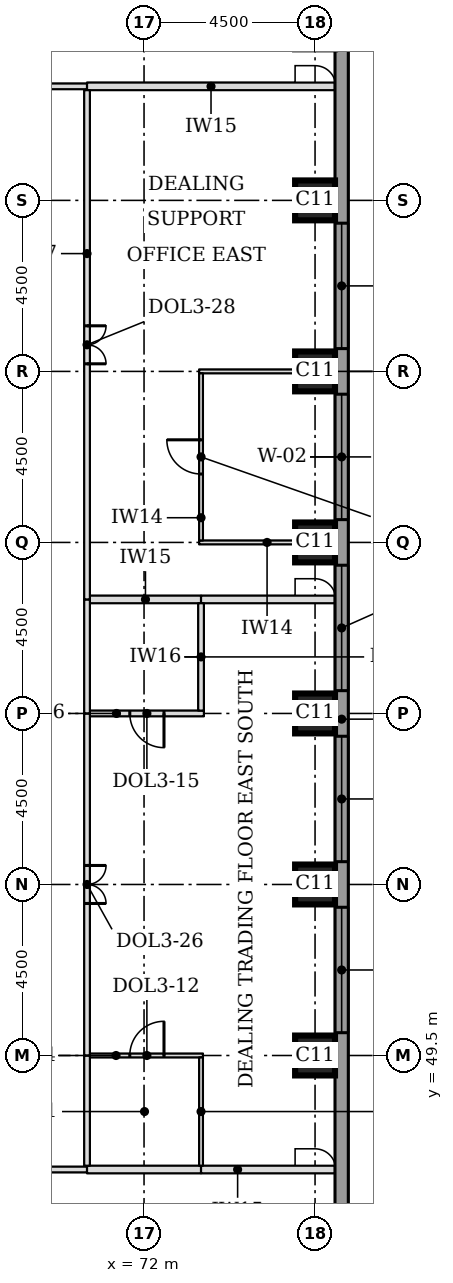
"""IFC4 building model, lengths in metres.
Left out: names, types, materials, properties, quantities, classifications, styles, units other than length and angle.
Written with IfcOpenShell. Run it as: python <this file> out.ifc"""

import sys

from ifc_helpers import new_model, si_unit, direction, frame, frame_2d, origin, origin_2d, place, context, subcontext, project, spatial, rectangle, extrude, element, fill, save


model = new_model("IFC4")
c1 = context("Model", 3, precision=1e-05, world=origin(), true_north=direction((0.0, 1.0)))
c2 = subcontext(c1, "Body", "Model", "MODEL_VIEW")
j1 = project(units=[si_unit("LENGTHUNIT", "METRE"), si_unit("PLANEANGLEUNIT", "RADIAN")], contexts=[c1])
p1 = place(None, origin())
s1 = spatial("IfcSite", under=j1, at=p1, CompositionType="ELEMENT")
p2 = place(p1, origin())
s2 = spatial("IfcBuilding", under=s1, at=p2, CompositionType="ELEMENT")
p3 = place(p2, frame((0.0, 0.0, 97.4)))
s3 = spatial("IfcBuildingStorey", under=s2, at=p3, CompositionType="ELEMENT", Elevation=97.4)
for number, where, z_axis, x_axis in (
    (1, (76.5, 49.5, 0.0), (0.0, 0.0, 1.0), (1.0, 0.0, 0.0)),
    (2, (76.5, 54.0, 0.0), (0.0, 0.0, 1.0), (1.0, 0.0, 0.0)),
    (3, (76.5, 58.5, 0.0), (0.0, 0.0, 1.0), (1.0, 0.0, 0.0)),
    (4, (76.5, 63.0, 0.0), (0.0, 0.0, 1.0), (1.0, 0.0, 0.0)),
    (5, (76.5, 67.5, 0.0), (0.0, 0.0, 1.0), (1.0, 0.0, 0.0)),
    (6, (76.5, 72.0, 0.0), (0.0, 0.0, 1.0), (1.0, 0.0, 0.0)),
):
    element("IfcColumn", number, at=place(p3, frame(where, z_axis=z_axis, x_axis=x_axis)), inside=s3, PredefinedType="COLUMN", context=c2, shape_type="SweptSolid", body=[
        extrude(rectangle(XDim=1.05, YDim=1.05, at=origin_2d()), origin(), (0.0, 0.0, 1.0), 3.7),
    ])
p4 = place(p3, frame((77.2, 44.638, 0.0), z_axis=(0.0, 0.0, 1.0), x_axis=(0.0, 1.0, 0.0)))
e7 = element("IfcWall", 7, at=p4, inside=s3, PredefinedType="STANDARD", context=c2, shape_type="SweptSolid", body=[
    extrude(rectangle(XDim=32.225, YDim=0.35, at=frame_2d((16.112, 0.0))), origin(), (0.0, 0.0, 1.0), 3.525),
])
p5 = place(p4, frame((5.462, 0.0, 0.9)))
e8 = element("IfcOpeningElement", 8, at=p5, cuts=e7, PredefinedType="OPENING", context=c2, shape_type="SweptSolid", body=[
    extrude(rectangle(XDim=3.3, YDim=1.9, at=frame_2d((1.65, 0.95))), frame((0.0, 0.185, 0.0), z_axis=(0.0, -1.0, 0.0), x_axis=(1.0, 0.0, 0.0)), (0.0, 0.0, 1.0), 0.37),
])
p6 = place(p4, frame((9.962, 0.0, 0.9)))
e9 = element("IfcOpeningElement", 9, at=p6, cuts=e7, PredefinedType="OPENING", context=c2, shape_type="SweptSolid", body=[
    extrude(rectangle(XDim=3.3, YDim=1.9, at=frame_2d((1.65, 0.95))), frame((0.0, 0.185, 0.0), z_axis=(0.0, -1.0, 0.0), x_axis=(1.0, 0.0, 0.0)), (0.0, 0.0, 1.0), 0.37),
])
p7 = place(p4, frame((14.462, 0.0, 0.9)))
e10 = element("IfcOpeningElement", 10, at=p7, cuts=e7, PredefinedType="OPENING", context=c2, shape_type="SweptSolid", body=[
    extrude(rectangle(XDim=3.3, YDim=1.9, at=frame_2d((1.65, 0.95))), frame((0.0, 0.185, 0.0), z_axis=(0.0, -1.0, 0.0), x_axis=(1.0, 0.0, 0.0)), (0.0, 0.0, 1.0), 0.37),
])
p8 = place(p4, frame((18.962, 0.0, 0.9)))
e11 = element("IfcOpeningElement", 11, at=p8, cuts=e7, PredefinedType="OPENING", context=c2, shape_type="SweptSolid", body=[
    extrude(rectangle(XDim=3.3, YDim=1.9, at=frame_2d((1.65, 0.95))), frame((0.0, 0.185, 0.0), z_axis=(0.0, -1.0, 0.0), x_axis=(1.0, 0.0, 0.0)), (0.0, 0.0, 1.0), 0.37),
])
p9 = place(p4, frame((23.462, 0.0, 0.9)))
e12 = element("IfcOpeningElement", 12, at=p9, cuts=e7, PredefinedType="OPENING", context=c2, shape_type="SweptSolid", body=[
    extrude(rectangle(XDim=3.3, YDim=1.9, at=frame_2d((1.65, 0.95))), frame((0.0, 0.185, 0.0), z_axis=(0.0, -1.0, 0.0), x_axis=(1.0, 0.0, 0.0)), (0.0, 0.0, 1.0), 0.37),
])
p10 = place(p3, frame((54.0, 46.5, 0.0), z_axis=(0.0, 0.0, 1.0), x_axis=(1.0, 0.0, 0.0)))
e13 = element("IfcWall", 13, at=p10, inside=s3, PredefinedType="PARTITIONING", context=c2, shape_type="SweptSolid", body=[
    extrude(rectangle(XDim=16.5, YDim=0.15, at=frame_2d((8.25, 0.0))), origin(), (0.0, 0.0, 1.0), 3.55),
])
p11 = place(p3, frame((70.5, 46.5, 0.0), z_axis=(0.0, 0.0, 1.0), x_axis=(1.0, 0.0, 0.0)))
e14 = element("IfcWall", 14, at=p11, inside=s3, PredefinedType="PARTITIONING", context=c2, shape_type="SweptSolid", body=[
    extrude(rectangle(XDim=3.0, YDim=0.2, at=frame_2d((1.5, 0.0))), origin(), (0.0, 0.0, 1.0), 3.55),
])
p12 = place(p3, frame((73.5, 46.5, 0.0), z_axis=(0.0, 0.0, 1.0), x_axis=(1.0, 0.0, 0.0)))
e15 = element("IfcWall", 15, at=p12, inside=s3, PredefinedType="PARTITIONING", context=c2, shape_type="SweptSolid", body=[
    extrude(rectangle(XDim=3.525, YDim=0.2, at=frame_2d((1.762, 0.0))), origin(), (0.0, 0.0, 1.0), 3.55),
])
p13 = place(p3, frame((70.575, 49.5, 0.0), z_axis=(0.0, 0.0, 1.0), x_axis=(1.0, 0.0, 0.0)))
e16 = element("IfcWall", 16, at=p13, inside=s3, PredefinedType="PARTITIONING", context=c2, shape_type="SweptSolid", body=[
    extrude(rectangle(XDim=2.975, YDim=0.1, at=frame_2d((1.488, 0.0))), origin(), (0.0, 0.0, 1.0), 3.55),
])
p14 = place(p13, frame((1.05, 0.0, 0.0)))
e17 = element("IfcOpeningElement", 17, at=p14, cuts=e16, PredefinedType="OPENING", context=c2, shape_type="SweptSolid", body=[
    extrude(rectangle(XDim=0.9, YDim=2.1, at=frame_2d((0.45, 1.05))), frame((0.0, 0.06, 0.0), z_axis=(0.0, -1.0, 0.0), x_axis=(1.0, 0.0, 0.0)), (0.0, 0.0, 1.0), 0.12),
])
p15 = place(p3, frame((70.575, 58.5, 0.0), z_axis=(0.0, 0.0, 1.0), x_axis=(1.0, 0.0, 0.0)))
e18 = element("IfcWall", 18, at=p15, inside=s3, PredefinedType="PARTITIONING", context=c2, shape_type="SweptSolid", body=[
    extrude(rectangle(XDim=3.0, YDim=0.15, at=frame_2d((1.5, 0.0))), origin(), (0.0, 0.0, 1.0), 3.55),
])
p16 = place(p15, frame((1.05, 0.0, 0.0)))
e19 = element("IfcOpeningElement", 19, at=p16, cuts=e18, PredefinedType="OPENING", context=c2, shape_type="SweptSolid", body=[
    extrude(rectangle(XDim=0.9, YDim=2.1, at=frame_2d((0.45, 1.05))), frame((0.0, 0.085, 0.0), z_axis=(0.0, -1.0, 0.0), x_axis=(1.0, 0.0, 0.0)), (0.0, 0.0, 1.0), 0.17),
])
p17 = place(p3, frame((70.575, 61.5, 0.0), z_axis=(0.0, 0.0, 1.0), x_axis=(1.0, 0.0, 0.0)))
e20 = element("IfcWall", 20, at=p17, inside=s3, PredefinedType="PARTITIONING", context=c2, shape_type="SweptSolid", body=[
    extrude(rectangle(XDim=2.925, YDim=0.2, at=frame_2d((1.462, 0.0))), origin(), (0.0, 0.0, 1.0), 3.55),
])
p18 = place(p3, frame((73.5, 61.5, 0.0), z_axis=(0.0, 0.0, 1.0), x_axis=(1.0, 0.0, 0.0)))
e21 = element("IfcWall", 21, at=p18, inside=s3, PredefinedType="PARTITIONING", context=c2, shape_type="SweptSolid", body=[
    extrude(rectangle(XDim=3.525, YDim=0.2, at=frame_2d((1.762, 0.0))), origin(), (0.0, 0.0, 1.0), 3.55),
])
for number, where, z_axis, x_axis in (
    (22, (73.45, 63.0, 0.0), (0.0, 0.0, 1.0), (1.0, 0.0, 0.0)),
    (23, (73.45, 67.5, 0.0), (0.0, 0.0, 1.0), (1.0, 0.0, 0.0)),
):
    element("IfcWall", number, at=place(p3, frame(where, z_axis=z_axis, x_axis=x_axis)), inside=s3, PredefinedType="PARTITIONING", context=c2, shape_type="SweptSolid", body=[
        extrude(rectangle(XDim=3.575, YDim=0.1, at=frame_2d((1.788, 0.0))), origin(), (0.0, 0.0, 1.0), 3.55),
    ])
p19 = place(p3, frame((49.5, 75.0, 0.0), z_axis=(0.0, 0.0, 1.0), x_axis=(1.0, 0.0, 0.0)))
e24 = element("IfcWall", 24, at=p19, inside=s3, PredefinedType="PARTITIONING", context=c2, shape_type="SweptSolid", body=[
    extrude(rectangle(XDim=21.0, YDim=0.15, at=frame_2d((10.5, 0.0))), origin(), (0.0, 0.0, 1.0), 3.55),
])
p20 = place(p19, frame((10.0, 0.0, 0.0)))
e25 = element("IfcOpeningElement", 25, at=p20, cuts=e24, PredefinedType="OPENING", context=c2, shape_type="SweptSolid", body=[
    extrude(rectangle(XDim=1.0, YDim=2.1, at=frame_2d((0.5, 1.05))), frame((0.0, 0.085, 0.0), z_axis=(0.0, -1.0, 0.0), x_axis=(1.0, 0.0, 0.0)), (0.0, 0.0, 1.0), 0.17),
])
p21 = place(p3, frame((70.5, 75.0, 0.0), z_axis=(0.0, 0.0, 1.0), x_axis=(1.0, 0.0, 0.0)))
e26 = element("IfcWall", 26, at=p21, inside=s3, PredefinedType="PARTITIONING", context=c2, shape_type="SweptSolid", body=[
    extrude(rectangle(XDim=6.525, YDim=0.2, at=frame_2d((3.262, 0.0))), origin(), (0.0, 0.0, 1.0), 3.55),
])
p22 = place(p3, frame((70.5, 46.6, 0.0), z_axis=(0.0, 0.0, 1.0), x_axis=(0.0, 1.0, 0.0)))
e27 = element("IfcWall", 27, at=p22, inside=s3, PredefinedType="PARTITIONING", context=c2, shape_type="SweptSolid", body=[
    extrude(rectangle(XDim=2.9, YDim=0.15, at=frame_2d((1.45, 0.0))), origin(), (0.0, 0.0, 1.0), 3.55),
])
p23 = place(p3, frame((73.5, 46.6, 0.0), z_axis=(0.0, 0.0, 1.0), x_axis=(0.0, 1.0, 0.0)))
e28 = element("IfcWall", 28, at=p23, inside=s3, PredefinedType="PARTITIONING", context=c2, shape_type="SweptSolid", body=[
    extrude(rectangle(XDim=2.85, YDim=0.1, at=frame_2d((1.425, 0.0))), origin(), (0.0, 0.0, 1.0), 3.55),
])
p24 = place(p3, frame((70.5, 49.5, 0.0), z_axis=(0.0, 0.0, 1.0), x_axis=(0.0, 1.0, 0.0)))
e29 = element("IfcWall", 29, at=p24, inside=s3, PredefinedType="PARTITIONING", context=c2, shape_type="SweptSolid", body=[
    extrude(rectangle(XDim=9.0, YDim=0.15, at=frame_2d((4.5, 0.0))), origin(), (0.0, 0.0, 1.0), 3.55),
])
p25 = place(p24, frame((4.0, 0.0, 0.0)))
e30 = element("IfcOpeningElement", 30, at=p25, cuts=e29, PredefinedType="OPENING", context=c2, shape_type="SweptSolid", body=[
    extrude(rectangle(XDim=1.0, YDim=2.1, at=frame_2d((0.5, 1.05))), frame((0.0, 0.085, 0.0), z_axis=(0.0, -1.0, 0.0), x_axis=(1.0, 0.0, 0.0)), (0.0, 0.0, 1.0), 0.17),
])
p26 = place(p3, frame((70.5, 58.5, 0.0), z_axis=(0.0, 0.0, 1.0), x_axis=(0.0, 1.0, 0.0)))
e31 = element("IfcWall", 31, at=p26, inside=s3, PredefinedType="PARTITIONING", context=c2, shape_type="SweptSolid", body=[
    extrude(rectangle(XDim=3.0, YDim=0.15, at=frame_2d((1.5, 0.0))), origin(), (0.0, 0.0, 1.0), 3.55),
])
p27 = place(p3, frame((73.5, 58.575, 0.0), z_axis=(0.0, 0.0, 1.0), x_axis=(0.0, 1.0, 0.0)))
e32 = element("IfcWall", 32, at=p27, inside=s3, PredefinedType="PARTITIONING", context=c2, shape_type="SweptSolid", body=[
    extrude(rectangle(XDim=2.825, YDim=0.15, at=frame_2d((1.413, 0.0))), origin(), (0.0, 0.0, 1.0), 3.55),
])
p28 = place(p3, frame((70.5, 61.5, 0.0), z_axis=(0.0, 0.0, 1.0), x_axis=(0.0, 1.0, 0.0)))
e33 = element("IfcWall", 33, at=p28, inside=s3, PredefinedType="PARTITIONING", context=c2, shape_type="SweptSolid", body=[
    extrude(rectangle(XDim=13.4, YDim=0.15, at=frame_2d((6.7, 0.0))), origin(), (0.0, 0.0, 1.0), 3.55),
])
p29 = place(p28, frame((6.2, 0.0, 0.0)))
e34 = element("IfcOpeningElement", 34, at=p29, cuts=e33, PredefinedType="OPENING", context=c2, shape_type="SweptSolid", body=[
    extrude(rectangle(XDim=1.0, YDim=2.1, at=frame_2d((0.5, 1.05))), frame((0.0, 0.085, 0.0), z_axis=(0.0, -1.0, 0.0), x_axis=(1.0, 0.0, 0.0)), (0.0, 0.0, 1.0), 0.17),
])
p30 = place(p3, frame((73.5, 63.05, 0.0), z_axis=(0.0, 0.0, 1.0), x_axis=(0.0, 1.0, 0.0)))
e35 = element("IfcWall", 35, at=p30, inside=s3, PredefinedType="PARTITIONING", context=c2, shape_type="SweptSolid", body=[
    extrude(rectangle(XDim=4.4, YDim=0.1, at=frame_2d((2.2, 0.0))), origin(), (0.0, 0.0, 1.0), 3.55),
])
p31 = place(p30, frame((1.75, 0.0, 0.0)))
e36 = element("IfcOpeningElement", 36, at=p31, cuts=e35, PredefinedType="OPENING", context=c2, shape_type="SweptSolid", body=[
    extrude(rectangle(XDim=0.9, YDim=2.1, at=frame_2d((0.45, 1.05))), frame((0.0, 0.06, 0.0), z_axis=(0.0, -1.0, 0.0), x_axis=(1.0, 0.0, 0.0)), (0.0, 0.0, 1.0), 0.12),
])
p32 = place(p5, origin())
e37 = element("IfcWindow", 37, at=p32, inside=s3, PartitioningType="SINGLE_PANEL", PredefinedType="WINDOW", context=c2, shape_type="SweptSolid", body=[
    extrude(rectangle(XDim=3.3, YDim=1.9, at=frame_2d((1.65, 0.95))), frame((0.0, 0.085, 0.0), z_axis=(0.0, -1.0, 0.0), x_axis=(1.0, 0.0, 0.0)), (0.0, 0.0, 1.0), 0.06),
])
fill(e8, e37)
p33 = place(p6, origin())
e38 = element("IfcWindow", 38, at=p33, inside=s3, PartitioningType="SINGLE_PANEL", PredefinedType="WINDOW", context=c2, shape_type="SweptSolid", body=[
    extrude(rectangle(XDim=3.3, YDim=1.9, at=frame_2d((1.65, 0.95))), frame((0.0, 0.085, 0.0), z_axis=(0.0, -1.0, 0.0), x_axis=(1.0, 0.0, 0.0)), (0.0, 0.0, 1.0), 0.06),
])
fill(e9, e38)
p34 = place(p7, origin())
e39 = element("IfcWindow", 39, at=p34, inside=s3, PartitioningType="SINGLE_PANEL", PredefinedType="WINDOW", context=c2, shape_type="SweptSolid", body=[
    extrude(rectangle(XDim=3.3, YDim=1.9, at=frame_2d((1.65, 0.95))), frame((0.0, 0.085, 0.0), z_axis=(0.0, -1.0, 0.0), x_axis=(1.0, 0.0, 0.0)), (0.0, 0.0, 1.0), 0.06),
])
fill(e10, e39)
p35 = place(p8, origin())
e40 = element("IfcWindow", 40, at=p35, inside=s3, PartitioningType="SINGLE_PANEL", PredefinedType="WINDOW", context=c2, shape_type="SweptSolid", body=[
    extrude(rectangle(XDim=3.3, YDim=1.9, at=frame_2d((1.65, 0.95))), frame((0.0, 0.085, 0.0), z_axis=(0.0, -1.0, 0.0), x_axis=(1.0, 0.0, 0.0)), (0.0, 0.0, 1.0), 0.06),
])
fill(e11, e40)
p36 = place(p9, origin())
e41 = element("IfcWindow", 41, at=p36, inside=s3, PartitioningType="SINGLE_PANEL", PredefinedType="WINDOW", context=c2, shape_type="SweptSolid", body=[
    extrude(rectangle(XDim=3.3, YDim=1.9, at=frame_2d((1.65, 0.95))), frame((0.0, 0.085, 0.0), z_axis=(0.0, -1.0, 0.0), x_axis=(1.0, 0.0, 0.0)), (0.0, 0.0, 1.0), 0.06),
])
fill(e12, e41)
p37 = place(p25, frame((1.0, 0.0, 0.0), z_axis=(0.0, 0.0, 1.0), x_axis=(-1.0, 0.0, 0.0)))
e42 = element("IfcDoor", 42, at=p37, inside=s3, OperationType="DOUBLE_DOOR_SINGLE_SWING", PredefinedType="DOOR", context=c2, shape_type="SweptSolid", body=[
    extrude(rectangle(XDim=1.0, YDim=2.1, at=frame_2d((0.5, 1.05))), frame((0.0, 0.025, 0.0), z_axis=(0.0, -1.0, 0.0), x_axis=(1.0, 0.0, 0.0)), (0.0, 0.0, 1.0), 0.05),
])
fill(e30, e42)
p38 = place(p16, frame((0.9, 0.0, 0.0), z_axis=(0.0, 0.0, 1.0), x_axis=(-1.0, 0.0, 0.0)))
e43 = element("IfcDoor", 43, at=p38, inside=s3, OperationType="SINGLE_SWING_LEFT", PredefinedType="DOOR", context=c2, shape_type="SweptSolid", body=[
    extrude(rectangle(XDim=0.9, YDim=2.1, at=frame_2d((0.45, 1.05))), frame((0.0, 0.025, 0.0), z_axis=(0.0, -1.0, 0.0), x_axis=(1.0, 0.0, 0.0)), (0.0, 0.0, 1.0), 0.05),
])
fill(e19, e43)
p39 = place(p14, origin())
e44 = element("IfcDoor", 44, at=p39, inside=s3, OperationType="SINGLE_SWING_RIGHT", PredefinedType="DOOR", context=c2, shape_type="SweptSolid", body=[
    extrude(rectangle(XDim=0.9, YDim=2.1, at=frame_2d((0.45, 1.05))), frame((0.0, 0.025, 0.0), z_axis=(0.0, -1.0, 0.0), x_axis=(1.0, 0.0, 0.0)), (0.0, 0.0, 1.0), 0.05),
])
fill(e17, e44)
p40 = place(p29, frame((1.0, 0.0, 0.0), z_axis=(0.0, 0.0, 1.0), x_axis=(-1.0, 0.0, 0.0)))
e45 = element("IfcDoor", 45, at=p40, inside=s3, OperationType="DOUBLE_DOOR_SINGLE_SWING", PredefinedType="DOOR", context=c2, shape_type="SweptSolid", body=[
    extrude(rectangle(XDim=1.0, YDim=2.1, at=frame_2d((0.5, 1.05))), frame((0.0, 0.025, 0.0), z_axis=(0.0, -1.0, 0.0), x_axis=(1.0, 0.0, 0.0)), (0.0, 0.0, 1.0), 0.05),
])
fill(e34, e45)
p41 = place(p31, origin())
e46 = element("IfcDoor", 46, at=p41, inside=s3, OperationType="SINGLE_SWING_RIGHT", PredefinedType="DOOR", context=c2, shape_type="SweptSolid", body=[
    extrude(rectangle(XDim=0.9, YDim=2.1, at=frame_2d((0.45, 1.05))), frame((0.0, 0.025, 0.0), z_axis=(0.0, -1.0, 0.0), x_axis=(1.0, 0.0, 0.0)), (0.0, 0.0, 1.0), 0.05),
])
fill(e36, e46)
save(model, sys.argv[1])
